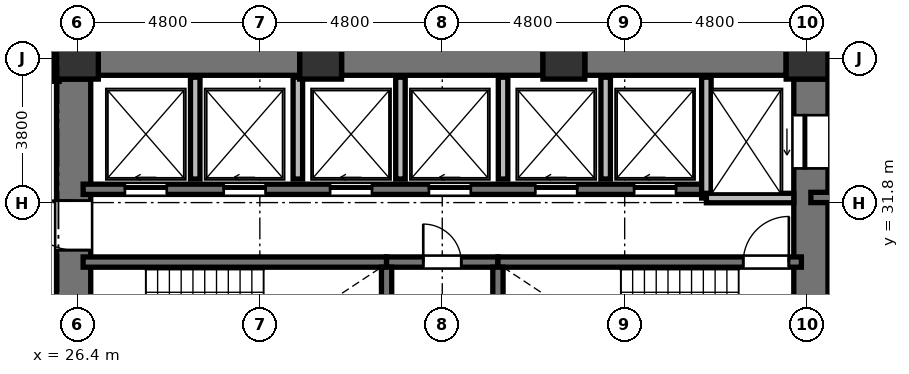
"""IFC4 building model, lengths in metres.
Left out: names, types, materials, properties, quantities, classifications, styles, units other than length and angle.
Written with IfcOpenShell. Run it as: python <this file> out.ifc"""

import sys

from ifc_helpers import new_model, si_unit, direction, frame, frame_2d, origin, origin_2d, place, context, subcontext, project, spatial, rectangle, extrude, element, fill, save


model = new_model("IFC4")
c1 = context("Model", 3, precision=1e-05, world=origin(), true_north=direction((0.0, 1.0)))
c2 = subcontext(c1, "Body", "Model", "MODEL_VIEW")
j1 = project(units=[si_unit("LENGTHUNIT", "METRE"), si_unit("PLANEANGLEUNIT", "RADIAN")], contexts=[c1])
p1 = place(None, origin())
s1 = spatial("IfcSite", under=j1, at=p1, CompositionType="ELEMENT")
p2 = place(p1, origin())
s2 = spatial("IfcBuilding", under=s1, at=p2, CompositionType="ELEMENT")
p3 = place(p2, frame((0.0, 0.0, 47.088)))
s3 = spatial("IfcBuildingStorey", under=s2, at=p3, CompositionType="ELEMENT", Elevation=47.088)
for number, where, z_axis, x_axis in (
    (1, (45.6, 35.6, 0.0), (0.0, 0.0, 1.0), (1.0, 0.0, 0.0)),
    (2, (39.2, 35.6, 0.0), (0.0, 0.0, 1.0), (1.0, 0.0, 0.0)),
    (3, (32.8, 35.6, 0.0), (0.0, 0.0, 1.0), (1.0, 0.0, 0.0)),
    (4, (26.4, 35.6, 0.0), (0.0, 0.0, 1.0), (1.0, 0.0, 0.0)),
):
    element("IfcColumn", number, at=place(p3, frame(where, z_axis=z_axis, x_axis=x_axis)), inside=s3, PredefinedType="COLUMN", context=c2, shape_type="SweptSolid", body=[
        extrude(rectangle(XDim=1.1, YDim=1.1, at=origin_2d()), origin(), (0.0, 0.0, 1.0), 3.648),
    ])
p4 = place(p3, frame((26.3, 20.95, 0.0), z_axis=(0.0, 0.0, 1.0), x_axis=(0.0, 1.0, 0.0)))
e5 = element("IfcWall", 5, at=p4, inside=s3, PredefinedType="SHEAR", context=c2, shape_type="SweptSolid", body=[
    extrude(rectangle(XDim=14.1, YDim=0.9, at=frame_2d((7.05, 0.0))), origin(), (0.0, 0.0, 1.0), 3.648),
])
p5 = place(p4, frame((6.5, 0.0, 0.0)))
e6 = element("IfcOpeningElement", 6, at=p5, cuts=e5, PredefinedType="OPENING", context=c2, shape_type="SweptSolid", body=[
    extrude(rectangle(XDim=1.2, YDim=2.15, at=frame_2d((0.6, 1.075))), frame((0.0, 0.46, 0.0), z_axis=(0.0, -1.0, 0.0), x_axis=(1.0, 0.0, 0.0)), (0.0, 0.0, 1.0), 0.92),
])
p6 = place(p4, frame((9.6, 0.0, 0.0)))
e7 = element("IfcOpeningElement", 7, at=p6, cuts=e5, PredefinedType="OPENING", context=c2, shape_type="SweptSolid", body=[
    extrude(rectangle(XDim=1.3, YDim=2.2, at=frame_2d((0.65, 1.1))), frame((0.0, 0.46, 0.0), z_axis=(0.0, -1.0, 0.0), x_axis=(1.0, 0.0, 0.0)), (0.0, 0.0, 1.0), 0.92),
])
p7 = place(p4, frame((3.26, 0.0, 0.0)))
e8 = element("IfcOpeningElement", 8, at=p7, cuts=e5, PredefinedType="OPENING", context=c2, shape_type="SweptSolid", body=[
    extrude(rectangle(XDim=1.3, YDim=2.2, at=frame_2d((0.65, 1.1))), frame((0.0, 0.46, 0.0), z_axis=(0.0, -1.0, 0.0), x_axis=(1.0, 0.0, 0.0)), (0.0, 0.0, 1.0), 0.92),
])
p8 = place(p3, frame((45.7, 20.95, 0.0), z_axis=(0.0, 0.0, 1.0), x_axis=(0.0, 1.0, 0.0)))
e9 = element("IfcWall", 9, at=p8, inside=s3, PredefinedType="SHEAR", context=c2, shape_type="SweptSolid", body=[
    extrude(rectangle(XDim=14.1, YDim=0.9, at=frame_2d((7.05, 0.0))), origin(), (0.0, 0.0, 1.0), 3.648),
])
p9 = place(p8, frame((11.75, 0.0, 0.0)))
e10 = element("IfcOpeningElement", 10, at=p9, cuts=e9, PredefinedType="OPENING", context=c2, shape_type="SweptSolid", body=[
    extrude(rectangle(XDim=1.4, YDim=2.3, at=frame_2d((0.7, 1.15))), frame((0.0, 0.46, 0.0), z_axis=(0.0, -1.0, 0.0), x_axis=(1.0, 0.0, 0.0)), (0.0, 0.0, 1.0), 0.92),
])
p10 = place(p8, frame((0.95, 0.0, 0.0)))
e11 = element("IfcOpeningElement", 11, at=p10, cuts=e9, PredefinedType="OPENING", context=c2, shape_type="SweptSolid", body=[
    extrude(rectangle(XDim=1.4, YDim=2.3, at=frame_2d((0.7, 1.15))), frame((0.0, 0.46, 0.0), z_axis=(0.0, -1.0, 0.0), x_axis=(1.0, 0.0, 0.0)), (0.0, 0.0, 1.0), 0.92),
])
p11 = place(p3, frame((26.95, 35.6, 0.0), z_axis=(0.0, 0.0, 1.0), x_axis=(1.0, 0.0, 0.0)))
e12 = element("IfcWall", 12, at=p11, inside=s3, PredefinedType="SHEAR", context=c2, shape_type="SweptSolid", body=[
    extrude(rectangle(XDim=5.3, YDim=0.9, at=frame_2d((2.65, 0.0))), origin(), (0.0, 0.0, 1.0), 3.648),
])
p12 = place(p3, frame((33.35, 35.6, 0.0), z_axis=(0.0, 0.0, 1.0), x_axis=(1.0, 0.0, 0.0)))
e13 = element("IfcWall", 13, at=p12, inside=s3, PredefinedType="SHEAR", context=c2, shape_type="SweptSolid", body=[
    extrude(rectangle(XDim=5.3, YDim=0.9, at=frame_2d((2.65, 0.0))), origin(), (0.0, 0.0, 1.0), 3.648),
])
p13 = place(p3, frame((39.75, 35.6, 0.0), z_axis=(0.0, 0.0, 1.0), x_axis=(1.0, 0.0, 0.0)))
e14 = element("IfcWall", 14, at=p13, inside=s3, PredefinedType="SHEAR", context=c2, shape_type="SweptSolid", body=[
    extrude(rectangle(XDim=5.3, YDim=0.9, at=frame_2d((2.65, 0.0))), origin(), (0.0, 0.0, 1.0), 3.648),
])
p14 = place(p3, frame((26.55, 30.235, 0.0), z_axis=(0.0, 0.0, 1.0), x_axis=(1.0, 0.0, 0.0)))
e15 = element("IfcWall", 15, at=p14, inside=s3, PredefinedType="SHEAR", context=c2, shape_type="SweptSolid", body=[
    extrude(rectangle(XDim=7.985, YDim=0.27, at=frame_2d((3.992, 0.0))), origin(), (0.0, 0.0, 1.0), 3.648),
])
p15 = place(p3, frame((34.535, 30.235, 0.0), z_axis=(0.0, 0.0, 1.0), x_axis=(1.0, 0.0, 0.0)))
e16 = element("IfcWall", 16, at=p15, inside=s3, PredefinedType="SHEAR", context=c2, shape_type="SweptSolid", body=[
    extrude(rectangle(XDim=2.93, YDim=0.27, at=frame_2d((1.465, 0.0))), origin(), (0.0, 0.0, 1.0), 3.648),
])
p16 = place(p15, frame((0.965, 0.0, 0.0)))
e17 = element("IfcOpeningElement", 17, at=p16, cuts=e16, PredefinedType="OPENING", context=c2, shape_type="SweptSolid", body=[
    extrude(rectangle(XDim=1.0, YDim=2.1, at=frame_2d((0.5, 1.05))), frame((0.0, 0.145, 0.0), z_axis=(0.0, -1.0, 0.0), x_axis=(1.0, 0.0, 0.0)), (0.0, 0.0, 1.0), 0.29),
])
p17 = place(p3, frame((37.465, 30.235, 0.0), z_axis=(0.0, 0.0, 1.0), x_axis=(1.0, 0.0, 0.0)))
e18 = element("IfcWall", 18, at=p17, inside=s3, PredefinedType="SHEAR", context=c2, shape_type="SweptSolid", body=[
    extrude(rectangle(XDim=7.985, YDim=0.27, at=frame_2d((3.992, 0.0))), origin(), (0.0, 0.0, 1.0), 3.648),
])
p18 = place(p17, frame((6.455, 0.0, 0.0)))
e19 = element("IfcOpeningElement", 19, at=p18, cuts=e18, PredefinedType="OPENING", context=c2, shape_type="SweptSolid", body=[
    extrude(rectangle(XDim=1.2, YDim=2.15, at=frame_2d((0.6, 1.075))), frame((0.0, 0.145, 0.0), z_axis=(0.0, -1.0, 0.0), x_axis=(1.0, 0.0, 0.0)), (0.0, 0.0, 1.0), 0.29),
])
for number, where, z_axis, x_axis in (
    (20, (34.535, 26.02, 0.0), (0.0, 0.0, 1.0), (0.0, 1.0, 0.0)),
    (21, (37.465, 26.02, 0.0), (0.0, 0.0, 1.0), (0.0, 1.0, 0.0)),
):
    element("IfcWall", number, at=place(p3, frame(where, z_axis=z_axis, x_axis=x_axis)), inside=s3, PredefinedType="SHEAR", context=c2, shape_type="SweptSolid", body=[
        extrude(rectangle(XDim=4.08, YDim=0.27, at=frame_2d((2.04, 0.0))), origin(), (0.0, 0.0, 1.0), 3.648),
    ])
p19 = place(p3, frame((26.55, 32.15, 0.0), z_axis=(0.0, 0.0, 1.0), x_axis=(1.0, 0.0, 0.0)))
e22 = element("IfcWall", 22, at=p19, inside=s3, PredefinedType="SHEAR", context=c2, shape_type="SweptSolid", body=[
    extrude(rectangle(XDim=16.4, YDim=0.27, at=frame_2d((8.2, 0.0))), origin(), (0.0, 0.0, 1.0), 3.648),
])
p20 = place(p19, frame((1.1, 0.0, 0.0)))
e23 = element("IfcOpeningElement", 23, at=p20, cuts=e22, PredefinedType="OPENING", context=c2, shape_type="SweptSolid", body=[
    extrude(rectangle(XDim=1.1, YDim=2.2, at=frame_2d((0.55, 1.1))), frame((0.0, 0.145, 0.0), z_axis=(0.0, -1.0, 0.0), x_axis=(1.0, 0.0, 0.0)), (0.0, 0.0, 1.0), 0.29),
])
p21 = place(p19, frame((3.7, 0.0, 0.0)))
e24 = element("IfcOpeningElement", 24, at=p21, cuts=e22, PredefinedType="OPENING", context=c2, shape_type="SweptSolid", body=[
    extrude(rectangle(XDim=1.1, YDim=2.2, at=frame_2d((0.55, 1.1))), frame((0.0, 0.145, 0.0), z_axis=(0.0, -1.0, 0.0), x_axis=(1.0, 0.0, 0.0)), (0.0, 0.0, 1.0), 0.29),
])
p22 = place(p19, frame((6.5, 0.0, 0.0)))
e25 = element("IfcOpeningElement", 25, at=p22, cuts=e22, PredefinedType="OPENING", context=c2, shape_type="SweptSolid", body=[
    extrude(rectangle(XDim=1.1, YDim=2.2, at=frame_2d((0.55, 1.1))), frame((0.0, 0.145, 0.0), z_axis=(0.0, -1.0, 0.0), x_axis=(1.0, 0.0, 0.0)), (0.0, 0.0, 1.0), 0.29),
])
p23 = place(p19, frame((9.1, 0.0, 0.0)))
e26 = element("IfcOpeningElement", 26, at=p23, cuts=e22, PredefinedType="OPENING", context=c2, shape_type="SweptSolid", body=[
    extrude(rectangle(XDim=1.1, YDim=2.2, at=frame_2d((0.55, 1.1))), frame((0.0, 0.145, 0.0), z_axis=(0.0, -1.0, 0.0), x_axis=(1.0, 0.0, 0.0)), (0.0, 0.0, 1.0), 0.29),
])
p24 = place(p19, frame((11.9, 0.0, 0.0)))
e27 = element("IfcOpeningElement", 27, at=p24, cuts=e22, PredefinedType="OPENING", context=c2, shape_type="SweptSolid", body=[
    extrude(rectangle(XDim=1.1, YDim=2.2, at=frame_2d((0.55, 1.1))), frame((0.0, 0.145, 0.0), z_axis=(0.0, -1.0, 0.0), x_axis=(1.0, 0.0, 0.0)), (0.0, 0.0, 1.0), 0.29),
])
p25 = place(p19, frame((14.5, 0.0, 0.0)))
e28 = element("IfcOpeningElement", 28, at=p25, cuts=e22, PredefinedType="OPENING", context=c2, shape_type="SweptSolid", body=[
    extrude(rectangle(XDim=1.1, YDim=2.2, at=frame_2d((0.55, 1.1))), frame((0.0, 0.145, 0.0), z_axis=(0.0, -1.0, 0.0), x_axis=(1.0, 0.0, 0.0)), (0.0, 0.0, 1.0), 0.29),
])
p26 = place(p3, frame((42.95, 31.92, 0.0), z_axis=(0.0, 0.0, 1.0), x_axis=(0.0, 1.0, 0.0)))
e29 = element("IfcWall", 29, at=p26, inside=s3, PredefinedType="SOLIDWALL", context=c2, shape_type="SweptSolid", body=[
    extrude(rectangle(XDim=3.18, YDim=0.25, at=frame_2d((1.59, 0.0))), origin(), (0.0, 0.0, 1.0), 3.428),
])
p27 = place(p3, frame((42.95, 31.92, 0.0), z_axis=(0.0, 0.0, 1.0), x_axis=(1.0, 0.0, 0.0)))
e30 = element("IfcWall", 30, at=p27, inside=s3, PredefinedType="SOLIDWALL", context=c2, shape_type="SweptSolid", body=[
    extrude(rectangle(XDim=2.3, YDim=0.25, at=frame_2d((1.15, 0.0))), origin(), (0.0, 0.0, 1.0), 3.428),
])
for number, where, z_axis, x_axis in (
    (31, (29.5, 32.42, 0.0), (0.0, 0.0, 1.0), (0.0, 1.0, 0.0)),
    (32, (32.2, 32.42, 0.0), (0.0, 0.0, 1.0), (0.0, 1.0, 0.0)),
    (33, (34.9, 32.42, 0.0), (0.0, 0.0, 1.0), (0.0, 1.0, 0.0)),
    (34, (37.6, 32.42, 0.0), (0.0, 0.0, 1.0), (0.0, 1.0, 0.0)),
    (35, (40.3, 32.42, 0.0), (0.0, 0.0, 1.0), (0.0, 1.0, 0.0)),
):
    element("IfcWall", number, at=place(p3, frame(where, z_axis=z_axis, x_axis=x_axis)), inside=s3, PredefinedType="SOLIDWALL", context=c2, shape_type="SweptSolid", body=[
        extrude(rectangle(XDim=2.68, YDim=0.25, at=frame_2d((1.34, 0.0))), origin(), (0.0, 0.0, 1.0), 3.428),
    ])
p28 = place(p3, frame((45.7, 31.935, 0.0), z_axis=(0.0, 0.0, 1.0), x_axis=(1.0, 0.0, 0.0)))
e36 = element("IfcWall", 36, at=p28, inside=s3, PredefinedType="SHEAR", context=c2, shape_type="SweptSolid", body=[
    extrude(rectangle(XDim=4.715, YDim=0.27, at=frame_2d((2.357, 0.0))), origin(), (0.0, 0.0, 1.0), 3.648),
])
p29 = place(p3, frame((25.83, 36.21, 0.0), z_axis=(0.0, 0.0, 1.0), x_axis=(0.0, -1.0, 0.0)))
e37 = element("IfcWall", 37, at=p29, inside=s3, PredefinedType="PARTITIONING", context=c2, shape_type="SweptSolid", body=[
    extrude(rectangle(XDim=1.22, YDim=0.18, at=frame_2d((0.61, 0.0))), origin(), (0.0, 0.0, 1.0), 3.428),
])
p30 = place(p18, origin())
e38 = element("IfcDoor", 38, at=p30, inside=s3, OperationType="SINGLE_SWING_RIGHT", PredefinedType="DOOR", context=c2, shape_type="SweptSolid", body=[
    extrude(rectangle(XDim=1.2, YDim=2.15, at=frame_2d((0.6, 1.075))), frame((0.0, 0.025, 0.0), z_axis=(0.0, -1.0, 0.0), x_axis=(1.0, 0.0, 0.0)), (0.0, 0.0, 1.0), 0.05),
])
fill(e19, e38)
p31 = place(p16, origin())
e39 = element("IfcDoor", 39, at=p31, inside=s3, OperationType="SINGLE_SWING_LEFT", PredefinedType="DOOR", context=c2, shape_type="SweptSolid", body=[
    extrude(rectangle(XDim=1.0, YDim=2.1, at=frame_2d((0.5, 1.05))), frame((0.0, 0.025, 0.0), z_axis=(0.0, -1.0, 0.0), x_axis=(1.0, 0.0, 0.0)), (0.0, 0.0, 1.0), 0.05),
])
fill(e17, e39)
p32 = place(p6, origin())
e40 = element("IfcDoor", 40, at=p32, inside=s3, OperationType="SINGLE_SWING_RIGHT", PredefinedType="DOOR", context=c2, shape_type="SweptSolid", body=[
    extrude(rectangle(XDim=1.3, YDim=2.2, at=frame_2d((0.65, 1.1))), frame((0.0, 0.025, 0.0), z_axis=(0.0, -1.0, 0.0), x_axis=(1.0, 0.0, 0.0)), (0.0, 0.0, 1.0), 0.05),
])
fill(e7, e40)
p33 = place(p20, origin())
e41 = element("IfcDoor", 41, at=p33, inside=s3, OperationType="SLIDING_TO_LEFT", PredefinedType="DOOR", context=c2, shape_type="SweptSolid", body=[
    extrude(rectangle(XDim=1.1, YDim=2.2, at=frame_2d((0.55, 1.1))), frame((0.0, 0.025, 0.0), z_axis=(0.0, -1.0, 0.0), x_axis=(1.0, 0.0, 0.0)), (0.0, 0.0, 1.0), 0.05),
])
fill(e23, e41)
p34 = place(p21, origin())
e42 = element("IfcDoor", 42, at=p34, inside=s3, OperationType="SLIDING_TO_LEFT", PredefinedType="DOOR", context=c2, shape_type="SweptSolid", body=[
    extrude(rectangle(XDim=1.1, YDim=2.2, at=frame_2d((0.55, 1.1))), frame((0.0, 0.025, 0.0), z_axis=(0.0, -1.0, 0.0), x_axis=(1.0, 0.0, 0.0)), (0.0, 0.0, 1.0), 0.05),
])
fill(e24, e42)
p35 = place(p22, origin())
e43 = element("IfcDoor", 43, at=p35, inside=s3, OperationType="SLIDING_TO_LEFT", PredefinedType="DOOR", context=c2, shape_type="SweptSolid", body=[
    extrude(rectangle(XDim=1.1, YDim=2.2, at=frame_2d((0.55, 1.1))), frame((0.0, 0.025, 0.0), z_axis=(0.0, -1.0, 0.0), x_axis=(1.0, 0.0, 0.0)), (0.0, 0.0, 1.0), 0.05),
])
fill(e25, e43)
p36 = place(p23, origin())
e44 = element("IfcDoor", 44, at=p36, inside=s3, OperationType="SLIDING_TO_LEFT", PredefinedType="DOOR", context=c2, shape_type="SweptSolid", body=[
    extrude(rectangle(XDim=1.1, YDim=2.2, at=frame_2d((0.55, 1.1))), frame((0.0, 0.025, 0.0), z_axis=(0.0, -1.0, 0.0), x_axis=(1.0, 0.0, 0.0)), (0.0, 0.0, 1.0), 0.05),
])
fill(e26, e44)
p37 = place(p24, origin())
e45 = element("IfcDoor", 45, at=p37, inside=s3, OperationType="SLIDING_TO_LEFT", PredefinedType="DOOR", context=c2, shape_type="SweptSolid", body=[
    extrude(rectangle(XDim=1.1, YDim=2.2, at=frame_2d((0.55, 1.1))), frame((0.0, 0.025, 0.0), z_axis=(0.0, -1.0, 0.0), x_axis=(1.0, 0.0, 0.0)), (0.0, 0.0, 1.0), 0.05),
])
fill(e27, e45)
p38 = place(p25, origin())
e46 = element("IfcDoor", 46, at=p38, inside=s3, OperationType="SLIDING_TO_LEFT", PredefinedType="DOOR", context=c2, shape_type="SweptSolid", body=[
    extrude(rectangle(XDim=1.1, YDim=2.2, at=frame_2d((0.55, 1.1))), frame((0.0, 0.025, 0.0), z_axis=(0.0, -1.0, 0.0), x_axis=(1.0, 0.0, 0.0)), (0.0, 0.0, 1.0), 0.05),
])
fill(e28, e46)
p39 = place(p9, origin())
e47 = element("IfcDoor", 47, at=p39, inside=s3, OperationType="SLIDING_TO_LEFT", PredefinedType="DOOR", context=c2, shape_type="SweptSolid", body=[
    extrude(rectangle(XDim=1.4, YDim=2.3, at=frame_2d((0.7, 1.15))), frame((0.0, 0.025, 0.0), z_axis=(0.0, -1.0, 0.0), x_axis=(1.0, 0.0, 0.0)), (0.0, 0.0, 1.0), 0.05),
])
fill(e10, e47)
save(model, sys.argv[1])
